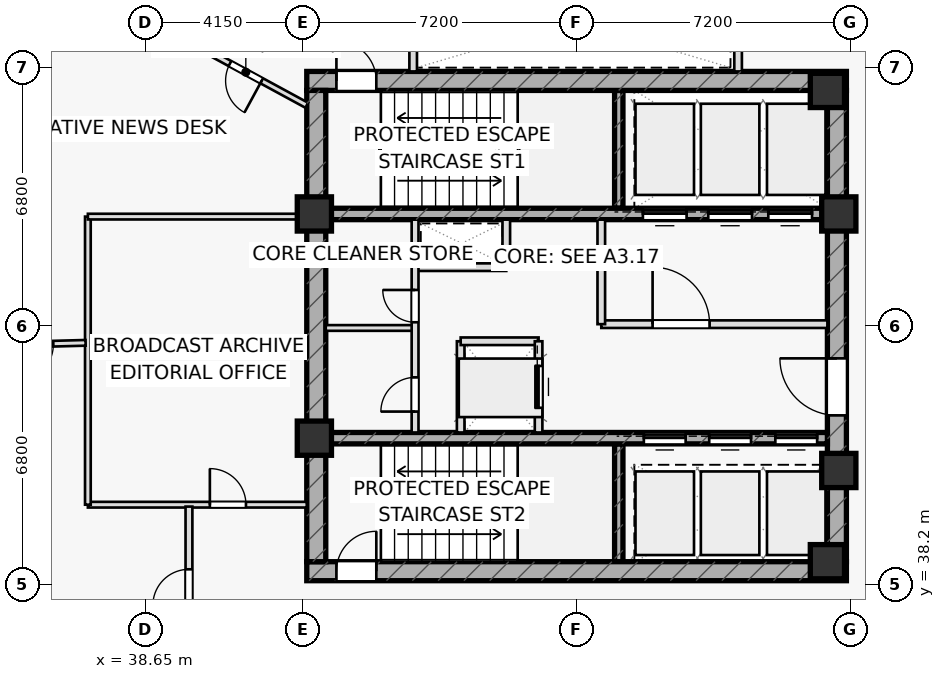
"""IFC4 building model, lengths in metres.
Left out: names, types, materials, properties, quantities, classifications, styles, units other than length and angle.
Written with IfcOpenShell. Run it as: python <this file> out.ifc"""

import sys

from ifc_helpers import new_model, si_unit, direction, frame, frame_2d, origin, origin_2d, place, context, subcontext, project, spatial, rectangle, extrude, element, fill, save


model = new_model("IFC4")
c1 = context("Model", 3, precision=1e-05, world=origin(), true_north=direction((0.0, 1.0)))
c2 = subcontext(c1, "Body", "Model", "MODEL_VIEW")
j1 = project(units=[si_unit("LENGTHUNIT", "METRE"), si_unit("PLANEANGLEUNIT", "RADIAN")], contexts=[c1])
p1 = place(None, origin())
s1 = spatial("IfcSite", under=j1, at=p1, CompositionType="ELEMENT")
p2 = place(p1, origin())
s2 = spatial("IfcBuilding", under=s1, at=p2, CompositionType="ELEMENT")
p3 = place(p2, frame((0.0, 0.0, 173.35)))
s3 = spatial("IfcBuildingStorey", under=s2, at=p3, CompositionType="ELEMENT", Elevation=173.35)
for number, where, z_axis, x_axis in (
    (1, (51.11, 48.1, 0.0), (0.0, 0.0, 1.0), (0.0, 1.0, 0.0)),
    (2, (51.11, 38.8, 0.0), (0.0, 0.0, 1.0), (0.0, 1.0, 0.0)),
):
    element("IfcWall", number, at=place(p3, frame(where, z_axis=z_axis, x_axis=x_axis)), inside=s3, PredefinedType="SHEAR", context=c2, shape_type="SweptSolid", body=[
        extrude(rectangle(XDim=3.1, YDim=0.22, at=frame_2d((1.55, 0.0))), origin(), (0.0, 0.0, 1.0), 3.55),
    ])
p4 = place(p3, frame((42.9, 51.45, 0.0), z_axis=(0.0, 0.0, 1.0), x_axis=(1.0, 0.0, 0.0)))
e3 = element("IfcWall", 3, at=p4, inside=s3, PredefinedType="SHEAR", context=c2, shape_type="SweptSolid", body=[
    extrude(rectangle(XDim=14.2, YDim=0.5, at=frame_2d((7.1, 0.0))), origin(), (0.0, 0.0, 1.0), 3.55),
])
p5 = place(p4, frame((0.78, 0.0, 0.0)))
e4 = element("IfcOpeningElement", 4, at=p5, cuts=e3, PredefinedType="OPENING", context=c2, shape_type="SweptSolid", body=[
    extrude(rectangle(XDim=1.05, YDim=2.2, at=frame_2d((0.525, 1.1))), frame((0.0, 0.26, 0.0), z_axis=(0.0, -1.0, 0.0), x_axis=(1.0, 0.0, 0.0)), (0.0, 0.0, 1.0), 0.52),
])
p6 = place(p3, frame((42.9, 38.55, 0.0), z_axis=(0.0, 0.0, 1.0), x_axis=(1.0, 0.0, 0.0)))
e5 = element("IfcWall", 5, at=p6, inside=s3, PredefinedType="SHEAR", context=c2, shape_type="SweptSolid", body=[
    extrude(rectangle(XDim=14.2, YDim=0.5, at=frame_2d((7.1, 0.0))), origin(), (0.0, 0.0, 1.0), 3.55),
])
p7 = place(p6, frame((0.78, 0.0, 0.0)))
e6 = element("IfcOpeningElement", 6, at=p7, cuts=e5, PredefinedType="OPENING", context=c2, shape_type="SweptSolid", body=[
    extrude(rectangle(XDim=1.05, YDim=2.2, at=frame_2d((0.525, 1.1))), frame((0.0, 0.26, 0.0), z_axis=(0.0, -1.0, 0.0), x_axis=(1.0, 0.0, 0.0)), (0.0, 0.0, 1.0), 0.52),
])
p8 = place(p3, frame((43.15, 38.8, 0.0), z_axis=(0.0, 0.0, 1.0), x_axis=(0.0, 1.0, 0.0)))
e7 = element("IfcWall", 7, at=p8, inside=s3, PredefinedType="SHEAR", context=c2, shape_type="SweptSolid", body=[
    extrude(rectangle(XDim=12.4, YDim=0.5, at=frame_2d((6.2, 0.0))), origin(), (0.0, 0.0, 1.0), 3.55),
])
p9 = place(p3, frame((56.85, 38.8, 0.0), z_axis=(0.0, 0.0, 1.0), x_axis=(0.0, 1.0, 0.0)))
e8 = element("IfcWall", 8, at=p9, inside=s3, PredefinedType="SHEAR", context=c2, shape_type="SweptSolid", body=[
    extrude(rectangle(XDim=12.4, YDim=0.5, at=frame_2d((6.2, 0.0))), origin(), (0.0, 0.0, 1.0), 3.55),
])
p10 = place(p9, frame((3.85, 0.0, 0.0)))
e9 = element("IfcOpeningElement", 9, at=p10, cuts=e8, PredefinedType="OPENING", context=c2, shape_type="SweptSolid", body=[
    extrude(rectangle(XDim=1.5, YDim=2.2, at=frame_2d((0.75, 1.1))), frame((0.0, 0.26, 0.0), z_axis=(0.0, -1.0, 0.0), x_axis=(1.0, 0.0, 0.0)), (0.0, 0.0, 1.0), 0.52),
])
p11 = place(p3, frame((43.4, 47.95, 0.0), z_axis=(0.0, 0.0, 1.0), x_axis=(1.0, 0.0, 0.0)))
e10 = element("IfcWall", 10, at=p11, inside=s3, PredefinedType="SHEAR", context=c2, shape_type="SweptSolid", body=[
    extrude(rectangle(XDim=13.2, YDim=0.3, at=frame_2d((6.6, 0.0))), origin(), (0.0, 0.0, 1.0), 3.55),
])
p12 = place(p11, frame((8.345, 0.0, 0.0)))
e11 = element("IfcOpeningElement", 11, at=p12, cuts=e10, PredefinedType="OPENING", context=c2, shape_type="SweptSolid", body=[
    extrude(rectangle(XDim=1.15, YDim=2.2, at=frame_2d((0.575, 1.1))), frame((0.0, 0.16, 0.0), z_axis=(0.0, -1.0, 0.0), x_axis=(1.0, 0.0, 0.0)), (0.0, 0.0, 1.0), 0.32),
])
p13 = place(p11, frame((10.065, 0.0, 0.0)))
e12 = element("IfcOpeningElement", 12, at=p13, cuts=e10, PredefinedType="OPENING", context=c2, shape_type="SweptSolid", body=[
    extrude(rectangle(XDim=1.15, YDim=2.2, at=frame_2d((0.575, 1.1))), frame((0.0, 0.16, 0.0), z_axis=(0.0, -1.0, 0.0), x_axis=(1.0, 0.0, 0.0)), (0.0, 0.0, 1.0), 0.32),
])
p14 = place(p11, frame((11.645, 0.0, 0.0)))
e13 = element("IfcOpeningElement", 13, at=p14, cuts=e10, PredefinedType="OPENING", context=c2, shape_type="SweptSolid", body=[
    extrude(rectangle(XDim=1.15, YDim=2.2, at=frame_2d((0.575, 1.1))), frame((0.0, 0.16, 0.0), z_axis=(0.0, -1.0, 0.0), x_axis=(1.0, 0.0, 0.0)), (0.0, 0.0, 1.0), 0.32),
])
p15 = place(p3, frame((43.4, 42.05, 0.0), z_axis=(0.0, 0.0, 1.0), x_axis=(1.0, 0.0, 0.0)))
e14 = element("IfcWall", 14, at=p15, inside=s3, PredefinedType="SHEAR", context=c2, shape_type="SweptSolid", body=[
    extrude(rectangle(XDim=13.2, YDim=0.3, at=frame_2d((6.6, 0.0))), origin(), (0.0, 0.0, 1.0), 3.55),
])
p16 = place(p15, frame((8.37, 0.0, 0.0)))
e15 = element("IfcOpeningElement", 15, at=p16, cuts=e14, PredefinedType="OPENING", context=c2, shape_type="SweptSolid", body=[
    extrude(rectangle(XDim=1.1, YDim=2.15, at=frame_2d((0.55, 1.075))), frame((0.0, 0.16, 0.0), z_axis=(0.0, -1.0, 0.0), x_axis=(1.0, 0.0, 0.0)), (0.0, 0.0, 1.0), 0.32),
])
p17 = place(p15, frame((10.09, 0.0, 0.0)))
e16 = element("IfcOpeningElement", 16, at=p17, cuts=e14, PredefinedType="OPENING", context=c2, shape_type="SweptSolid", body=[
    extrude(rectangle(XDim=1.1, YDim=2.15, at=frame_2d((0.55, 1.075))), frame((0.0, 0.16, 0.0), z_axis=(0.0, -1.0, 0.0), x_axis=(1.0, 0.0, 0.0)), (0.0, 0.0, 1.0), 0.32),
])
p18 = place(p15, frame((11.83, 0.0, 0.0)))
e17 = element("IfcOpeningElement", 17, at=p18, cuts=e14, PredefinedType="OPENING", context=c2, shape_type="SweptSolid", body=[
    extrude(rectangle(XDim=1.1, YDim=2.15, at=frame_2d((0.55, 1.075))), frame((0.0, 0.16, 0.0), z_axis=(0.0, -1.0, 0.0), x_axis=(1.0, 0.0, 0.0)), (0.0, 0.0, 1.0), 0.32),
])
for number, where, z_axis, x_axis in (
    (18, (43.1, 47.95, 0.0), (0.0, 0.0, 1.0), (1.0, 0.0, 0.0)),
    (19, (56.9, 47.95, 0.0), (0.0, 0.0, 1.0), (1.0, 0.0, 0.0)),
    (20, (56.6, 51.2, 0.0), (0.0, 0.0, 1.0), (1.0, 0.0, 0.0)),
    (21, (43.1, 42.05, 0.0), (0.0, 0.0, 1.0), (1.0, 0.0, 0.0)),
    (22, (56.9, 41.2, 0.0), (0.0, 0.0, 1.0), (1.0, 0.0, 0.0)),
    (23, (56.6, 38.8, 0.0), (0.0, 0.0, 1.0), (1.0, 0.0, 0.0)),
):
    element("IfcColumn", number, at=place(p3, frame(where, z_axis=z_axis, x_axis=x_axis)), inside=s3, PredefinedType="COLUMN", context=c2, shape_type="SweptSolid", body=[
        extrude(rectangle(XDim=0.9, YDim=0.9, at=origin_2d()), origin(), (0.0, 0.0, 1.0), 3.55),
    ])
for number, where, z_axis, x_axis in (
    (24, (45.7, 51.7, 0.0), (0.0, 0.0, 1.0), (0.0, 1.0, 0.0)),
    (25, (54.25, 51.7, 0.0), (0.0, 0.0, 1.0), (0.0, 1.0, 0.0)),
):
    element("IfcWall", number, at=place(p3, frame(where, z_axis=z_axis, x_axis=x_axis)), inside=s3, PredefinedType="PARTITIONING", context=c2, shape_type="SweptSolid", body=[
        extrude(rectangle(XDim=2.6, YDim=0.2, at=frame_2d((1.3, 0.0))), origin(), (0.0, 0.0, 1.0), 3.55),
    ])
p19 = place(p3, frame((45.75, 46.55, 0.0), z_axis=(0.0, 0.0, 1.0), x_axis=(1.0, 0.0, 0.0)))
e26 = element("IfcWall", 26, at=p19, inside=s3, PredefinedType="PARTITIONING", context=c2, shape_type="SweptSolid", body=[
    extrude(rectangle(XDim=2.4, YDim=0.2, at=frame_2d((1.2, 0.0))), origin(), (0.0, 0.0, 1.0), 3.55),
])
p20 = place(p3, frame((48.15, 46.55, 0.0), z_axis=(0.0, 0.0, 1.0), x_axis=(0.0, 1.0, 0.0)))
e27 = element("IfcWall", 27, at=p20, inside=s3, PredefinedType="PARTITIONING", context=c2, shape_type="SweptSolid", body=[
    extrude(rectangle(XDim=1.25, YDim=0.2, at=frame_2d((0.625, 0.0))), origin(), (0.0, 0.0, 1.0), 3.55),
])
p21 = place(p3, frame((46.95, 42.2, 0.0), z_axis=(0.0, 0.0, 1.0), x_axis=(0.0, 1.0, 0.0)))
e28 = element("IfcWall", 28, at=p21, inside=s3, PredefinedType="PARTITIONING", context=c2, shape_type="SweptSolid", body=[
    extrude(rectangle(XDim=2.4, YDim=0.2, at=frame_2d((1.2, 0.0))), origin(), (0.0, 0.0, 1.0), 3.55),
])
p22 = place(p3, frame((46.95, 44.6, 0.0), z_axis=(0.0, 0.0, 1.0), x_axis=(1.0, 0.0, 0.0)))
e29 = element("IfcWall", 29, at=p22, inside=s3, PredefinedType="PARTITIONING", context=c2, shape_type="SweptSolid", body=[
    extrude(rectangle(XDim=2.05, YDim=0.2, at=frame_2d((1.025, 0.0))), origin(), (0.0, 0.0, 1.0), 3.55),
])
p23 = place(p3, frame((50.65, 45.05, 0.0), z_axis=(0.0, 0.0, 1.0), x_axis=(1.0, 0.0, 0.0)))
e30 = element("IfcWall", 30, at=p23, inside=s3, PredefinedType="PARTITIONING", context=c2, shape_type="SweptSolid", body=[
    extrude(rectangle(XDim=5.95, YDim=0.2, at=frame_2d((2.975, 0.0))), origin(), (0.0, 0.0, 1.0), 3.55),
])
p24 = place(p23, frame((1.35, 0.0, 0.0)))
e31 = element("IfcOpeningElement", 31, at=p24, cuts=e30, PredefinedType="OPENING", context=c2, shape_type="SweptSolid", body=[
    extrude(rectangle(XDim=1.5, YDim=2.2, at=frame_2d((0.75, 1.1))), frame((0.0, 0.11, 0.0), z_axis=(0.0, -1.0, 0.0), x_axis=(1.0, 0.0, 0.0)), (0.0, 0.0, 1.0), 0.22),
])
p25 = place(p3, frame((50.65, 45.05, 0.0), z_axis=(0.0, 0.0, 1.0), x_axis=(0.0, 1.0, 0.0)))
e32 = element("IfcWall", 32, at=p25, inside=s3, PredefinedType="PARTITIONING", context=c2, shape_type="SweptSolid", body=[
    extrude(rectangle(XDim=2.75, YDim=0.2, at=frame_2d((1.375, 0.0))), origin(), (0.0, 0.0, 1.0), 3.55),
])
p26 = place(p3, frame((43.4, 44.95, 0.0), z_axis=(0.0, 0.0, 1.0), x_axis=(1.0, 0.0, 0.0)))
e33 = element("IfcWall", 33, at=p26, inside=s3, PredefinedType="PARTITIONING", context=c2, shape_type="SweptSolid", body=[
    extrude(rectangle(XDim=2.35, YDim=0.15, at=frame_2d((1.175, 0.0))), origin(), (0.0, 0.0, 1.0), 3.55),
])
p27 = place(p3, frame((45.75, 42.2, 0.0), z_axis=(0.0, 0.0, 1.0), x_axis=(0.0, 1.0, 0.0)))
e34 = element("IfcWall", 34, at=p27, inside=s3, PredefinedType="PARTITIONING", context=c2, shape_type="SweptSolid", body=[
    extrude(rectangle(XDim=5.6, YDim=0.18, at=frame_2d((2.8, 0.0))), origin(), (0.0, 0.0, 1.0), 3.55),
])
p28 = place(p27, frame((0.55, 0.0, 0.0)))
e35 = element("IfcOpeningElement", 35, at=p28, cuts=e34, PredefinedType="OPENING", context=c2, shape_type="SweptSolid", body=[
    extrude(rectangle(XDim=0.9, YDim=2.05, at=frame_2d((0.45, 1.025))), frame((0.0, 0.1, 0.0), z_axis=(0.0, -1.0, 0.0), x_axis=(1.0, 0.0, 0.0)), (0.0, 0.0, 1.0), 0.2),
])
p29 = place(p27, frame((2.9, 0.0, 0.0)))
e36 = element("IfcOpeningElement", 36, at=p29, cuts=e34, PredefinedType="OPENING", context=c2, shape_type="SweptSolid", body=[
    extrude(rectangle(XDim=0.85, YDim=2.05, at=frame_2d((0.425, 1.025))), frame((0.0, 0.1, 0.0), z_axis=(0.0, -1.0, 0.0), x_axis=(1.0, 0.0, 0.0)), (0.0, 0.0, 1.0), 0.2),
])
p30 = place(p3, frame((37.14, 40.3, 0.0), z_axis=(0.0, 0.0, 1.0), x_axis=(1.0, 0.0, 0.0)))
e37 = element("IfcWall", 37, at=p30, inside=s3, PredefinedType="PARTITIONING", context=c2, shape_type="SweptSolid", body=[
    extrude(rectangle(XDim=5.76, YDim=0.15, at=frame_2d((2.88, 0.0))), origin(), (0.0, 0.0, 1.0), 3.55),
])
p31 = place(p30, frame((3.21, 0.0, 0.0)))
e38 = element("IfcOpeningElement", 38, at=p31, cuts=e37, PredefinedType="OPENING", context=c2, shape_type="SweptSolid", body=[
    extrude(rectangle(XDim=0.95, YDim=2.05, at=frame_2d((0.475, 1.025))), frame((0.0, 0.085, 0.0), z_axis=(0.0, -1.0, 0.0), x_axis=(1.0, 0.0, 0.0)), (0.0, 0.0, 1.0), 0.17),
])
p32 = place(p3, frame((37.14, 40.3, 0.0), z_axis=(0.0, 0.0, 1.0), x_axis=(0.0, 1.0, 0.0)))
e39 = element("IfcWall", 39, at=p32, inside=s3, PredefinedType="PARTITIONING", context=c2, shape_type="SweptSolid", body=[
    extrude(rectangle(XDim=7.58, YDim=0.15, at=frame_2d((3.79, 0.0))), origin(), (0.0, 0.0, 1.0), 2.935),
])
p33 = place(p3, frame((37.14, 47.88, 0.0), z_axis=(0.0, 0.0, 1.0), x_axis=(1.0, 0.0, 0.0)))
e40 = element("IfcWall", 40, at=p33, inside=s3, PredefinedType="PARTITIONING", context=c2, shape_type="SweptSolid", body=[
    extrude(rectangle(XDim=5.76, YDim=0.15, at=frame_2d((2.88, 0.0))), origin(), (0.0, 0.0, 1.0), 2.935),
])
p34 = place(p3, frame((42.9, 50.81, 0.0), z_axis=(0.0, 0.0, 1.0), x_axis=(-0.878812674831, 0.477166933637, 0.0)))
e41 = element("IfcWall", 41, at=p34, inside=s3, PredefinedType="PARTITIONING", context=c2, shape_type="SweptSolid", body=[
    extrude(rectangle(XDim=10.765, YDim=0.15, at=frame_2d((5.383, 0.0))), origin(), (0.0, 0.0, 1.0), 2.935),
])
p35 = place(p34, frame((1.35, 0.0, 0.0)))
e42 = element("IfcOpeningElement", 42, at=p35, cuts=e41, PredefinedType="OPENING", context=c2, shape_type="SweptSolid", body=[
    extrude(rectangle(XDim=0.95, YDim=2.05, at=frame_2d((0.475, 1.025))), frame((0.0, 0.085, 0.0), z_axis=(0.0, -1.0, 0.0), x_axis=(1.0, 0.0, 0.0)), (0.0, 0.0, 1.0), 0.17),
])
p36 = place(p3, frame((37.08, 44.559, 0.0), z_axis=(0.0, 0.0, 1.0), x_axis=(-0.999644695323, -0.026654889077, 0.0)))
e43 = element("IfcWall", 43, at=p36, inside=s3, PredefinedType="PARTITIONING", context=c2, shape_type="SweptSolid", body=[
    extrude(rectangle(XDim=4.241, YDim=0.15, at=frame_2d((2.12, 0.0))), origin(), (0.0, 0.0, 1.0), 3.025),
])
p37 = place(p36, frame((0.85, 0.0, 0.0)))
e44 = element("IfcOpeningElement", 44, at=p37, cuts=e43, PredefinedType="OPENING", context=c2, shape_type="SweptSolid", body=[
    extrude(rectangle(XDim=0.95, YDim=2.05, at=frame_2d((0.475, 1.025))), frame((0.0, 0.085, 0.0), z_axis=(0.0, -1.0, 0.0), x_axis=(1.0, 0.0, 0.0)), (0.0, 0.0, 1.0), 0.17),
])
p38 = place(p3, frame((39.8, 36.0, 0.0), z_axis=(0.0, 0.0, 1.0), x_axis=(0.0, 1.0, 0.0)))
e45 = element("IfcWall", 45, at=p38, inside=s3, PredefinedType="PARTITIONING", context=c2, shape_type="SweptSolid", body=[
    extrude(rectangle(XDim=4.25, YDim=0.18, at=frame_2d((2.125, 0.0))), origin(), (0.0, 0.0, 1.0), 2.935),
])
p39 = place(p38, frame((1.65, 0.0, 0.0)))
e46 = element("IfcOpeningElement", 46, at=p39, cuts=e45, PredefinedType="OPENING", context=c2, shape_type="SweptSolid", body=[
    extrude(rectangle(XDim=0.95, YDim=2.05, at=frame_2d((0.475, 1.025))), frame((0.0, 0.1, 0.0), z_axis=(0.0, -1.0, 0.0), x_axis=(1.0, 0.0, 0.0)), (0.0, 0.0, 1.0), 0.2),
])
p40 = place(p3, frame((49.0, 42.2, 0.0), z_axis=(0.0, 0.0, 1.0), x_axis=(0.0, 1.0, 0.0)))
e47 = element("IfcWall", 47, at=p40, inside=s3, PredefinedType="PARTITIONING", context=c2, shape_type="SweptSolid", body=[
    extrude(rectangle(XDim=2.4, YDim=0.2, at=frame_2d((1.2, 0.0))), origin(), (0.0, 0.0, 1.0), 3.55),
])
p41 = place(p40, frame((0.65, 0.0, 0.0)))
e48 = element("IfcOpeningElement", 48, at=p41, cuts=e47, PredefinedType="OPENING", context=c2, shape_type="SweptSolid", body=[
    extrude(rectangle(XDim=1.1, YDim=2.15, at=frame_2d((0.55, 1.075))), frame((0.0, 0.11, 0.0), z_axis=(0.0, -1.0, 0.0), x_axis=(1.0, 0.0, 0.0)), (0.0, 0.0, 1.0), 0.22),
])
p42 = place(p5, origin())
e49 = element("IfcDoor", 49, at=p42, inside=s3, OperationType="SINGLE_SWING_LEFT", PredefinedType="DOOR", context=c2, shape_type="SweptSolid", body=[
    extrude(rectangle(XDim=1.05, YDim=2.2, at=frame_2d((0.525, 1.1))), frame((0.0, 0.025, 0.0), z_axis=(0.0, -1.0, 0.0), x_axis=(1.0, 0.0, 0.0)), (0.0, 0.0, 1.0), 0.05),
])
fill(e4, e49)
p43 = place(p7, origin())
e50 = element("IfcDoor", 50, at=p43, inside=s3, OperationType="SINGLE_SWING_RIGHT", PredefinedType="DOOR", context=c2, shape_type="SweptSolid", body=[
    extrude(rectangle(XDim=1.05, YDim=2.2, at=frame_2d((0.525, 1.1))), frame((0.0, 0.025, 0.0), z_axis=(0.0, -1.0, 0.0), x_axis=(1.0, 0.0, 0.0)), (0.0, 0.0, 1.0), 0.05),
])
fill(e6, e50)
p44 = place(p10, origin())
e51 = element("IfcDoor", 51, at=p44, inside=s3, OperationType="SINGLE_SWING_RIGHT", PredefinedType="DOOR", context=c2, shape_type="SweptSolid", body=[
    extrude(rectangle(XDim=1.5, YDim=2.2, at=frame_2d((0.75, 1.1))), frame((0.0, 0.025, 0.0), z_axis=(0.0, -1.0, 0.0), x_axis=(1.0, 0.0, 0.0)), (0.0, 0.0, 1.0), 0.05),
])
fill(e9, e51)
p45 = place(p24, origin())
e52 = element("IfcDoor", 52, at=p45, inside=s3, OperationType="SINGLE_SWING_LEFT", PredefinedType="DOOR", context=c2, shape_type="SweptSolid", body=[
    extrude(rectangle(XDim=1.5, YDim=2.2, at=frame_2d((0.75, 1.1))), frame((0.0, 0.025, 0.0), z_axis=(0.0, -1.0, 0.0), x_axis=(1.0, 0.0, 0.0)), (0.0, 0.0, 1.0), 0.05),
])
fill(e31, e52)
p46 = place(p28, origin())
e53 = element("IfcDoor", 53, at=p46, inside=s3, OperationType="SINGLE_SWING_LEFT", PredefinedType="DOOR", context=c2, shape_type="SweptSolid", body=[
    extrude(rectangle(XDim=0.9, YDim=2.05, at=frame_2d((0.45, 1.025))), frame((0.0, 0.025, 0.0), z_axis=(0.0, -1.0, 0.0), x_axis=(1.0, 0.0, 0.0)), (0.0, 0.0, 1.0), 0.05),
])
fill(e35, e53)
p47 = place(p29, origin())
e54 = element("IfcDoor", 54, at=p47, inside=s3, OperationType="SINGLE_SWING_RIGHT", PredefinedType="DOOR", context=c2, shape_type="SweptSolid", body=[
    extrude(rectangle(XDim=0.85, YDim=2.05, at=frame_2d((0.425, 1.025))), frame((0.0, 0.025, 0.0), z_axis=(0.0, -1.0, 0.0), x_axis=(1.0, 0.0, 0.0)), (0.0, 0.0, 1.0), 0.05),
])
fill(e36, e54)
p48 = place(p31, origin())
e55 = element("IfcDoor", 55, at=p48, inside=s3, OperationType="SINGLE_SWING_LEFT", PredefinedType="DOOR", context=c2, shape_type="SweptSolid", body=[
    extrude(rectangle(XDim=0.95, YDim=2.05, at=frame_2d((0.475, 1.025))), frame((0.0, 0.025, 0.0), z_axis=(0.0, -1.0, 0.0), x_axis=(1.0, 0.0, 0.0)), (0.0, 0.0, 1.0), 0.05),
])
fill(e38, e55)
p49 = place(p35, origin())
e56 = element("IfcDoor", 56, at=p49, inside=s3, OperationType="SINGLE_SWING_LEFT", PredefinedType="DOOR", context=c2, shape_type="SweptSolid", body=[
    extrude(rectangle(XDim=0.95, YDim=2.05, at=frame_2d((0.475, 1.025))), frame((0.0, 0.025, 0.0), z_axis=(0.0, -1.0, 0.0), x_axis=(1.0, 0.0, 0.0)), (0.0, 0.0, 1.0), 0.05),
])
fill(e42, e56)
p50 = place(p37, origin())
e57 = element("IfcDoor", 57, at=p50, inside=s3, OperationType="SINGLE_SWING_RIGHT", PredefinedType="DOOR", context=c2, shape_type="SweptSolid", body=[
    extrude(rectangle(XDim=0.95, YDim=2.05, at=frame_2d((0.475, 1.025))), frame((0.0, 0.025, 0.0), z_axis=(0.0, -1.0, 0.0), x_axis=(1.0, 0.0, 0.0)), (0.0, 0.0, 1.0), 0.05),
])
fill(e44, e57)
p51 = place(p39, origin())
e58 = element("IfcDoor", 58, at=p51, inside=s3, OperationType="SINGLE_SWING_LEFT", PredefinedType="DOOR", context=c2, shape_type="SweptSolid", body=[
    extrude(rectangle(XDim=0.95, YDim=2.05, at=frame_2d((0.475, 1.025))), frame((0.0, 0.025, 0.0), z_axis=(0.0, -1.0, 0.0), x_axis=(1.0, 0.0, 0.0)), (0.0, 0.0, 1.0), 0.05),
])
fill(e46, e58)
p52 = place(p12, origin())
e59 = element("IfcDoor", 59, at=p52, inside=s3, OperationType="SLIDING_TO_LEFT", PredefinedType="DOOR", context=c2, shape_type="SweptSolid", body=[
    extrude(rectangle(XDim=1.15, YDim=2.2, at=frame_2d((0.575, 1.1))), frame((0.0, 0.025, 0.0), z_axis=(0.0, -1.0, 0.0), x_axis=(1.0, 0.0, 0.0)), (0.0, 0.0, 1.0), 0.05),
])
fill(e11, e59)
p53 = place(p13, origin())
e60 = element("IfcDoor", 60, at=p53, inside=s3, OperationType="SLIDING_TO_LEFT", PredefinedType="DOOR", context=c2, shape_type="SweptSolid", body=[
    extrude(rectangle(XDim=1.15, YDim=2.2, at=frame_2d((0.575, 1.1))), frame((0.0, 0.025, 0.0), z_axis=(0.0, -1.0, 0.0), x_axis=(1.0, 0.0, 0.0)), (0.0, 0.0, 1.0), 0.05),
])
fill(e12, e60)
p54 = place(p14, origin())
e61 = element("IfcDoor", 61, at=p54, inside=s3, OperationType="SLIDING_TO_LEFT", PredefinedType="DOOR", context=c2, shape_type="SweptSolid", body=[
    extrude(rectangle(XDim=1.15, YDim=2.2, at=frame_2d((0.575, 1.1))), frame((0.0, 0.025, 0.0), z_axis=(0.0, -1.0, 0.0), x_axis=(1.0, 0.0, 0.0)), (0.0, 0.0, 1.0), 0.05),
])
fill(e13, e61)
p55 = place(p16, origin())
e62 = element("IfcDoor", 62, at=p55, inside=s3, OperationType="SLIDING_TO_LEFT", PredefinedType="DOOR", context=c2, shape_type="SweptSolid", body=[
    extrude(rectangle(XDim=1.1, YDim=2.15, at=frame_2d((0.55, 1.075))), frame((0.0, 0.025, 0.0), z_axis=(0.0, -1.0, 0.0), x_axis=(1.0, 0.0, 0.0)), (0.0, 0.0, 1.0), 0.05),
])
fill(e15, e62)
p56 = place(p17, origin())
e63 = element("IfcDoor", 63, at=p56, inside=s3, OperationType="SLIDING_TO_LEFT", PredefinedType="DOOR", context=c2, shape_type="SweptSolid", body=[
    extrude(rectangle(XDim=1.1, YDim=2.15, at=frame_2d((0.55, 1.075))), frame((0.0, 0.025, 0.0), z_axis=(0.0, -1.0, 0.0), x_axis=(1.0, 0.0, 0.0)), (0.0, 0.0, 1.0), 0.05),
])
fill(e16, e63)
p57 = place(p18, origin())
e64 = element("IfcDoor", 64, at=p57, inside=s3, OperationType="SLIDING_TO_LEFT", PredefinedType="DOOR", context=c2, shape_type="SweptSolid", body=[
    extrude(rectangle(XDim=1.1, YDim=2.15, at=frame_2d((0.55, 1.075))), frame((0.0, 0.025, 0.0), z_axis=(0.0, -1.0, 0.0), x_axis=(1.0, 0.0, 0.0)), (0.0, 0.0, 1.0), 0.05),
])
fill(e17, e64)
p58 = place(p41, origin())
e65 = element("IfcDoor", 65, at=p58, inside=s3, OperationType="SLIDING_TO_RIGHT", PredefinedType="DOOR", context=c2, shape_type="SweptSolid", body=[
    extrude(rectangle(XDim=1.1, YDim=2.15, at=frame_2d((0.55, 1.075))), frame((0.0, 0.025, 0.0), z_axis=(0.0, -1.0, 0.0), x_axis=(1.0, 0.0, 0.0)), (0.0, 0.0, 1.0), 0.05),
])
fill(e48, e65)
save(model, sys.argv[1])
